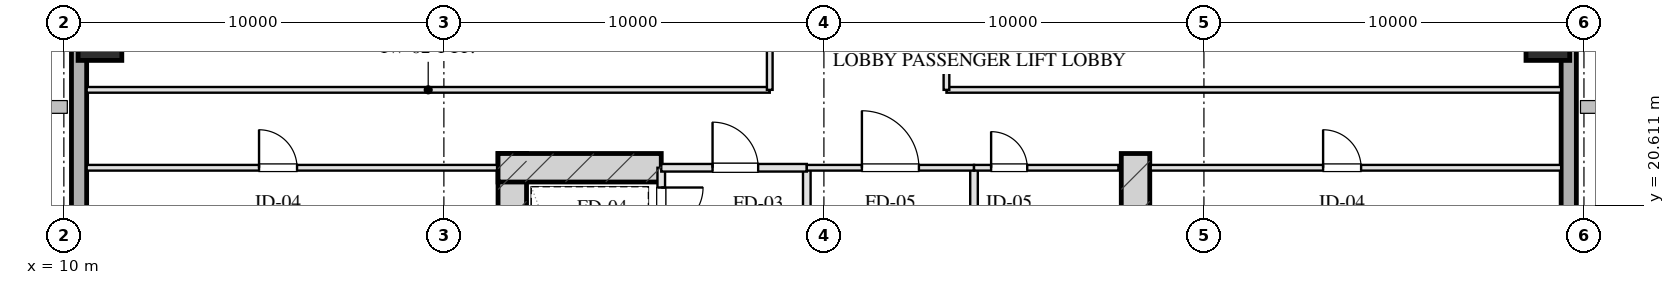
"""IFC4 building model, lengths in metres.
Left out: names, types, materials, properties, quantities, classifications, styles, units other than length and angle.
Written with IfcOpenShell. Run it as: python <this file> out.ifc"""

import sys

from ifc_helpers import new_model, si_unit, direction, frame, frame_2d, origin, origin_2d, place, context, subcontext, project, spatial, rectangle, hollow_rectangle, extrude, element, fill, save


model = new_model("IFC4")
c1 = context("Model", 3, precision=1e-05, world=origin(), true_north=direction((0.0, 1.0)))
c2 = subcontext(c1, "Body", "Model", "MODEL_VIEW")
j1 = project(units=[si_unit("LENGTHUNIT", "METRE"), si_unit("PLANEANGLEUNIT", "RADIAN")], contexts=[c1])
p1 = place(None, origin())
s1 = spatial("IfcSite", under=j1, at=p1, CompositionType="ELEMENT")
p2 = place(p1, origin())
s2 = spatial("IfcBuilding", under=s1, at=p2, CompositionType="ELEMENT")
p3 = place(p2, frame((0.0, 0.0, 67.85)))
s3 = spatial("IfcBuildingStorey", under=s2, at=p3, CompositionType="ELEMENT", Elevation=67.85)
for number, where, z_axis, x_axis in (
    (1, (21.8, 21.975, 0.0), (0.0, 0.0, 1.0), (0.0, -1.0, 0.0)),
    (2, (38.2, 21.975, 0.0), (0.0, 0.0, 1.0), (0.0, -1.0, 0.0)),
):
    element("IfcWall", number, at=place(p3, frame(where, z_axis=z_axis, x_axis=x_axis)), inside=s3, PredefinedType="SHEAR", context=c2, shape_type="SweptSolid", body=[
        extrude(rectangle(XDim=9.63, YDim=0.75, at=frame_2d((4.815, 0.0))), origin(), (0.0, 0.0, 1.0), 3.45),
    ])
p4 = place(p3, frame((21.425, 21.6, 0.0), z_axis=(0.0, 0.0, 1.0), x_axis=(1.0, 0.0, 0.0)))
e3 = element("IfcWall", 3, at=p4, inside=s3, PredefinedType="SHEAR", context=c2, shape_type="SweptSolid", body=[
    extrude(rectangle(XDim=4.295, YDim=0.75, at=frame_2d((2.147, 0.0))), origin(), (0.0, 0.0, 1.0), 3.45),
])
for number, where, z_axis, x_axis in (
    (4, (10.95, 25.0, 0.0), (0.0, 0.0, 1.0), (1.0, 0.0, 0.0)),
    (5, (49.05, 25.0, 0.0), (0.0, 0.0, 1.0), (1.0, 0.0, 0.0)),
):
    element("IfcColumn", number, at=place(p3, frame(where, z_axis=z_axis, x_axis=x_axis)), inside=s3, PredefinedType="COLUMN", context=c2, shape_type="SweptSolid", body=[
        extrude(hollow_rectangle(XDim=1.15, YDim=1.15, WallThickness=0.04, at=origin_2d()), origin(), (0.0, 0.0, 1.0), 3.451),
    ])
p5 = place(p3, frame((10.4, 7.2, 0.0), z_axis=(0.0, 0.0, 1.0), x_axis=(0.0, 1.0, 0.0)))
e6 = element("IfcWall", 6, at=p5, inside=s3, PredefinedType="SOLIDWALL", context=c2, shape_type="SweptSolid", body=[
    extrude(rectangle(XDim=53.6, YDim=0.4, at=frame_2d((26.8, 0.0))), origin(), (0.0, 0.0, 1.0), 2.61),
])
p6 = place(p5, frame((31.95, 0.0, 0.75)))
e7 = element("IfcOpeningElement", 7, at=p6, cuts=e6, PredefinedType="OPENING", context=c2, shape_type="SweptSolid", body=[
    extrude(rectangle(XDim=2.5, YDim=1.46, at=frame_2d((1.25, 0.73))), frame((0.0, 0.21, 0.0), z_axis=(0.0, -1.0, 0.0), x_axis=(1.0, 0.0, 0.0)), (0.0, 0.0, 1.0), 0.42),
])
p7 = place(p5, frame((20.45, 0.0, 0.0)))
e8 = element("IfcOpeningElement", 8, at=p7, cuts=e6, PredefinedType="OPENING", context=c2, shape_type="SweptSolid", body=[
    extrude(rectangle(XDim=1.1, YDim=2.15, at=frame_2d((0.55, 1.075))), frame((0.0, 0.21, 0.0), z_axis=(0.0, -1.0, 0.0), x_axis=(1.0, 0.0, 0.0)), (0.0, 0.0, 1.0), 0.42),
])
p8 = place(p3, frame((49.6, 60.8, 0.0), z_axis=(0.0, 0.0, 1.0), x_axis=(0.0, -1.0, 0.0)))
e9 = element("IfcWall", 9, at=p8, inside=s3, PredefinedType="SOLIDWALL", context=c2, shape_type="SweptSolid", body=[
    extrude(rectangle(XDim=53.6, YDim=0.4, at=frame_2d((26.8, 0.0))), origin(), (0.0, 0.0, 1.0), 2.61),
])
p9 = place(p8, frame((22.95, 0.0, 0.75)))
e10 = element("IfcOpeningElement", 10, at=p9, cuts=e9, PredefinedType="OPENING", context=c2, shape_type="SweptSolid", body=[
    extrude(rectangle(XDim=2.5, YDim=1.46, at=frame_2d((1.25, 0.73))), frame((0.0, 0.21, 0.0), z_axis=(0.0, -1.0, 0.0), x_axis=(1.0, 0.0, 0.0)), (0.0, 0.0, 1.0), 0.42),
])
p10 = place(p8, frame((29.35, 0.0, 0.0)))
e11 = element("IfcOpeningElement", 11, at=p10, cuts=e9, PredefinedType="OPENING", context=c2, shape_type="SweptSolid", body=[
    extrude(rectangle(XDim=1.1, YDim=2.15, at=frame_2d((0.55, 1.075))), frame((0.0, 0.21, 0.0), z_axis=(0.0, -1.0, 0.0), x_axis=(1.0, 0.0, 0.0)), (0.0, 0.0, 1.0), 0.42),
])
p11 = place(p3, frame((25.72, 21.6, 0.0), z_axis=(0.0, 0.0, 1.0), x_axis=(0.0, -1.0, 0.0)))
e12 = element("IfcWall", 12, at=p11, inside=s3, PredefinedType="PARTITIONING", context=c2, shape_type="SweptSolid", body=[
    extrude(rectangle(XDim=1.9, YDim=0.2, at=frame_2d((0.95, 0.0))), origin(), (0.0, 0.0, 1.0), 3.175),
])
p12 = place(p11, frame((0.52, 0.0, 0.0)))
e13 = element("IfcOpeningElement", 13, at=p12, cuts=e12, PredefinedType="OPENING", context=c2, shape_type="SweptSolid", body=[
    extrude(rectangle(XDim=1.1, YDim=2.05, at=frame_2d((0.55, 1.025))), frame((0.0, 0.11, 0.0), z_axis=(0.0, -1.0, 0.0), x_axis=(1.0, 0.0, 0.0)), (0.0, 0.0, 1.0), 0.22),
])
p13 = place(p3, frame((29.55, 21.6, 0.0), z_axis=(0.0, 0.0, 1.0), x_axis=(0.0, -1.0, 0.0)))
e14 = element("IfcWall", 14, at=p13, inside=s3, PredefinedType="PARTITIONING", context=c2, shape_type="SweptSolid", body=[
    extrude(rectangle(XDim=8.43, YDim=0.2, at=frame_2d((4.215, 0.0))), origin(), (0.0, 0.0, 1.0), 3.175),
])
p14 = place(p3, frame((25.72, 21.6, 0.0), z_axis=(0.0, 0.0, 1.0), x_axis=(1.0, 0.0, 0.0)))
e15 = element("IfcWall", 15, at=p14, inside=s3, PredefinedType="PARTITIONING", context=c2, shape_type="SweptSolid", body=[
    extrude(rectangle(XDim=3.83, YDim=0.2, at=frame_2d((1.915, 0.0))), origin(), (0.0, 0.0, 1.0), 3.175),
])
p15 = place(p14, frame((1.35, 0.0, 0.0)))
e16 = element("IfcOpeningElement", 16, at=p15, cuts=e15, PredefinedType="OPENING", context=c2, shape_type="SweptSolid", body=[
    extrude(rectangle(XDim=1.2, YDim=2.05, at=frame_2d((0.6, 1.025))), frame((0.0, 0.11, 0.0), z_axis=(0.0, -1.0, 0.0), x_axis=(1.0, 0.0, 0.0)), (0.0, 0.0, 1.0), 0.22),
])
p16 = place(p3, frame((33.95, 21.6, 0.0), z_axis=(0.0, 0.0, 1.0), x_axis=(0.0, -1.0, 0.0)))
e17 = element("IfcWall", 17, at=p16, inside=s3, PredefinedType="PARTITIONING", context=c2, shape_type="SweptSolid", body=[
    extrude(rectangle(XDim=8.43, YDim=0.2, at=frame_2d((4.215, 0.0))), origin(), (0.0, 0.0, 1.0), 3.175),
])
p17 = place(p3, frame((29.55, 21.6, 0.0), z_axis=(0.0, 0.0, 1.0), x_axis=(1.0, 0.0, 0.0)))
e18 = element("IfcWall", 18, at=p17, inside=s3, PredefinedType="PARTITIONING", context=c2, shape_type="SweptSolid", body=[
    extrude(rectangle(XDim=4.4, YDim=0.15, at=frame_2d((2.2, 0.0))), origin(), (0.0, 0.0, 1.0), 3.175),
])
p18 = place(p17, frame((1.45, 0.0, 0.0)))
e19 = element("IfcOpeningElement", 19, at=p18, cuts=e18, PredefinedType="OPENING", context=c2, shape_type="SweptSolid", body=[
    extrude(rectangle(XDim=1.5, YDim=2.05, at=frame_2d((0.75, 1.025))), frame((0.0, 0.085, 0.0), z_axis=(0.0, -1.0, 0.0), x_axis=(1.0, 0.0, 0.0)), (0.0, 0.0, 1.0), 0.17),
])
p19 = place(p3, frame((33.95, 21.6, 0.0), z_axis=(0.0, 0.0, 1.0), x_axis=(1.0, 0.0, 0.0)))
e20 = element("IfcWall", 20, at=p19, inside=s3, PredefinedType="PARTITIONING", context=c2, shape_type="SweptSolid", body=[
    extrude(rectangle(XDim=3.8, YDim=0.15, at=frame_2d((1.9, 0.0))), origin(), (0.0, 0.0, 1.0), 3.175),
])
p20 = place(p19, frame((0.45, 0.0, 0.0)))
e21 = element("IfcOpeningElement", 21, at=p20, cuts=e20, PredefinedType="OPENING", context=c2, shape_type="SweptSolid", body=[
    extrude(rectangle(XDim=0.95, YDim=2.05, at=frame_2d((0.475, 1.025))), frame((0.0, 0.085, 0.0), z_axis=(0.0, -1.0, 0.0), x_axis=(1.0, 0.0, 0.0)), (0.0, 0.0, 1.0), 0.17),
])
p21 = place(p3, frame((10.6, 21.6, 0.0), z_axis=(0.0, 0.0, 1.0), x_axis=(1.0, 0.0, 0.0)))
e22 = element("IfcWall", 22, at=p21, inside=s3, PredefinedType="PARTITIONING", context=c2, shape_type="SweptSolid", body=[
    extrude(rectangle(XDim=10.8, YDim=0.15, at=frame_2d((5.4, 0.0))), origin(), (0.0, 0.0, 1.0), 3.175),
])
p22 = place(p21, frame((4.536, 0.0, 0.0)))
e23 = element("IfcOpeningElement", 23, at=p22, cuts=e22, PredefinedType="OPENING", context=c2, shape_type="SweptSolid", body=[
    extrude(rectangle(XDim=1.0, YDim=2.05, at=frame_2d((0.5, 1.025))), frame((0.0, 0.085, 0.0), z_axis=(0.0, -1.0, 0.0), x_axis=(1.0, 0.0, 0.0)), (0.0, 0.0, 1.0), 0.17),
])
p23 = place(p3, frame((38.6, 21.6, 0.0), z_axis=(0.0, 0.0, 1.0), x_axis=(1.0, 0.0, 0.0)))
e24 = element("IfcWall", 24, at=p23, inside=s3, PredefinedType="PARTITIONING", context=c2, shape_type="SweptSolid", body=[
    extrude(rectangle(XDim=10.8, YDim=0.15, at=frame_2d((5.4, 0.0))), origin(), (0.0, 0.0, 1.0), 3.175),
])
p24 = place(p23, frame((4.536, 0.0, 0.0)))
e25 = element("IfcOpeningElement", 25, at=p24, cuts=e24, PredefinedType="OPENING", context=c2, shape_type="SweptSolid", body=[
    extrude(rectangle(XDim=1.0, YDim=2.05, at=frame_2d((0.5, 1.025))), frame((0.0, 0.085, 0.0), z_axis=(0.0, -1.0, 0.0), x_axis=(1.0, 0.0, 0.0)), (0.0, 0.0, 1.0), 0.17),
])
p25 = place(p3, frame((10.6, 23.65, 0.0), z_axis=(0.0, 0.0, 1.0), x_axis=(1.0, 0.0, 0.0)))
e26 = element("IfcWall", 26, at=p25, inside=s3, PredefinedType="PARTITIONING", context=c2, shape_type="SweptSolid", body=[
    extrude(rectangle(XDim=17.975, YDim=0.15, at=frame_2d((8.987, 0.0))), origin(), (0.0, 0.0, 1.0), 3.175),
])
p26 = place(p3, frame((33.225, 23.65, 0.0), z_axis=(0.0, 0.0, 1.0), x_axis=(1.0, 0.0, 0.0)))
e27 = element("IfcWall", 27, at=p26, inside=s3, PredefinedType="PARTITIONING", context=c2, shape_type="SweptSolid", body=[
    extrude(rectangle(XDim=16.175, YDim=0.15, at=frame_2d((8.087, 0.0))), origin(), (0.0, 0.0, 1.0), 3.175),
])
p27 = place(p3, frame((28.575, 23.65, 0.0), z_axis=(0.0, 0.0, 1.0), x_axis=(0.0, 1.0, 0.0)))
e28 = element("IfcWall", 28, at=p27, inside=s3, PredefinedType="PARTITIONING", context=c2, shape_type="SweptSolid", body=[
    extrude(rectangle(XDim=20.7, YDim=0.15, at=frame_2d((10.35, 0.0))), origin(), (0.0, 0.0, 1.0), 3.175),
])
p28 = place(p27, frame((2.675, 0.0, 0.0)))
e29 = element("IfcOpeningElement", 29, at=p28, cuts=e28, PredefinedType="OPENING", context=c2, shape_type="SweptSolid", body=[
    extrude(rectangle(XDim=1.0, YDim=2.05, at=frame_2d((0.5, 1.025))), frame((0.0, 0.085, 0.0), z_axis=(0.0, -1.0, 0.0), x_axis=(1.0, 0.0, 0.0)), (0.0, 0.0, 1.0), 0.17),
])
p29 = place(p27, frame((9.85, 0.0, 0.0)))
e30 = element("IfcOpeningElement", 30, at=p29, cuts=e28, PredefinedType="OPENING", context=c2, shape_type="SweptSolid", body=[
    extrude(rectangle(XDim=1.05, YDim=2.05, at=frame_2d((0.525, 1.025))), frame((0.0, 0.085, 0.0), z_axis=(0.0, -1.0, 0.0), x_axis=(1.0, 0.0, 0.0)), (0.0, 0.0, 1.0), 0.17),
])
p30 = place(p27, frame((17.025, 0.0, 0.0)))
e31 = element("IfcOpeningElement", 31, at=p30, cuts=e28, PredefinedType="OPENING", context=c2, shape_type="SweptSolid", body=[
    extrude(rectangle(XDim=1.0, YDim=2.05, at=frame_2d((0.5, 1.025))), frame((0.0, 0.085, 0.0), z_axis=(0.0, -1.0, 0.0), x_axis=(1.0, 0.0, 0.0)), (0.0, 0.0, 1.0), 0.17),
])
p31 = place(p3, frame((33.225, 23.65, 0.0), z_axis=(0.0, 0.0, 1.0), x_axis=(0.0, 1.0, 0.0)))
e32 = element("IfcWall", 32, at=p31, inside=s3, PredefinedType="PARTITIONING", context=c2, shape_type="SweptSolid", body=[
    extrude(rectangle(XDim=20.7, YDim=0.15, at=frame_2d((10.35, 0.0))), origin(), (0.0, 0.0, 1.0), 3.175),
])
p32 = place(p31, frame((2.175, 0.0, 0.0)))
e33 = element("IfcOpeningElement", 33, at=p32, cuts=e32, PredefinedType="OPENING", context=c2, shape_type="SweptSolid", body=[
    extrude(rectangle(XDim=1.0, YDim=2.05, at=frame_2d((0.5, 1.025))), frame((0.0, 0.085, 0.0), z_axis=(0.0, -1.0, 0.0), x_axis=(1.0, 0.0, 0.0)), (0.0, 0.0, 1.0), 0.17),
])
p33 = place(p31, frame((7.69, 0.0, 0.0)))
e34 = element("IfcOpeningElement", 34, at=p33, cuts=e32, PredefinedType="OPENING", context=c2, shape_type="SweptSolid", body=[
    extrude(rectangle(XDim=0.85, YDim=2.05, at=frame_2d((0.425, 1.025))), frame((0.0, 0.085, 0.0), z_axis=(0.0, -1.0, 0.0), x_axis=(1.0, 0.0, 0.0)), (0.0, 0.0, 1.0), 0.17),
])
p34 = place(p31, frame((12.69, 0.0, 0.0)))
e35 = element("IfcOpeningElement", 35, at=p34, cuts=e32, PredefinedType="OPENING", context=c2, shape_type="SweptSolid", body=[
    extrude(rectangle(XDim=1.0, YDim=2.05, at=frame_2d((0.5, 1.025))), frame((0.0, 0.085, 0.0), z_axis=(0.0, -1.0, 0.0), x_axis=(1.0, 0.0, 0.0)), (0.0, 0.0, 1.0), 0.17),
])
p35 = place(p31, frame((17.525, 0.0, 0.0)))
e36 = element("IfcOpeningElement", 36, at=p35, cuts=e32, PredefinedType="OPENING", context=c2, shape_type="SweptSolid", body=[
    extrude(rectangle(XDim=1.0, YDim=2.05, at=frame_2d((0.5, 1.025))), frame((0.0, 0.085, 0.0), z_axis=(0.0, -1.0, 0.0), x_axis=(1.0, 0.0, 0.0)), (0.0, 0.0, 1.0), 0.17),
])
p36 = place(p12, origin())
e37 = element("IfcDoor", 37, at=p36, inside=s3, OperationType="SINGLE_SWING_LEFT", PredefinedType="DOOR", context=c2, shape_type="SweptSolid", body=[
    extrude(rectangle(XDim=1.1, YDim=2.05, at=frame_2d((0.55, 1.025))), frame((0.0, 0.025, 0.0), z_axis=(0.0, -1.0, 0.0), x_axis=(1.0, 0.0, 0.0)), (0.0, 0.0, 1.0), 0.05),
])
fill(e13, e37)
p37 = place(p15, origin())
e38 = element("IfcDoor", 38, at=p37, inside=s3, OperationType="SINGLE_SWING_LEFT", PredefinedType="DOOR", context=c2, shape_type="SweptSolid", body=[
    extrude(rectangle(XDim=1.2, YDim=2.05, at=frame_2d((0.6, 1.025))), frame((0.0, 0.025, 0.0), z_axis=(0.0, -1.0, 0.0), x_axis=(1.0, 0.0, 0.0)), (0.0, 0.0, 1.0), 0.05),
])
fill(e16, e38)
p38 = place(p18, origin())
e39 = element("IfcDoor", 39, at=p38, inside=s3, OperationType="SINGLE_SWING_LEFT", PredefinedType="DOOR", context=c2, shape_type="SweptSolid", body=[
    extrude(rectangle(XDim=1.5, YDim=2.05, at=frame_2d((0.75, 1.025))), frame((0.0, 0.025, 0.0), z_axis=(0.0, -1.0, 0.0), x_axis=(1.0, 0.0, 0.0)), (0.0, 0.0, 1.0), 0.05),
])
fill(e19, e39)
p39 = place(p20, origin())
e40 = element("IfcDoor", 40, at=p39, inside=s3, OperationType="SINGLE_SWING_LEFT", PredefinedType="DOOR", context=c2, shape_type="SweptSolid", body=[
    extrude(rectangle(XDim=0.95, YDim=2.05, at=frame_2d((0.475, 1.025))), frame((0.0, 0.025, 0.0), z_axis=(0.0, -1.0, 0.0), x_axis=(1.0, 0.0, 0.0)), (0.0, 0.0, 1.0), 0.05),
])
fill(e21, e40)
p40 = place(p22, origin())
e41 = element("IfcDoor", 41, at=p40, inside=s3, OperationType="SINGLE_SWING_LEFT", PredefinedType="DOOR", context=c2, shape_type="SweptSolid", body=[
    extrude(rectangle(XDim=1.0, YDim=2.05, at=frame_2d((0.5, 1.025))), frame((0.0, 0.025, 0.0), z_axis=(0.0, -1.0, 0.0), x_axis=(1.0, 0.0, 0.0)), (0.0, 0.0, 1.0), 0.05),
])
fill(e23, e41)
p41 = place(p24, origin())
e42 = element("IfcDoor", 42, at=p41, inside=s3, OperationType="SINGLE_SWING_LEFT", PredefinedType="DOOR", context=c2, shape_type="SweptSolid", body=[
    extrude(rectangle(XDim=1.0, YDim=2.05, at=frame_2d((0.5, 1.025))), frame((0.0, 0.025, 0.0), z_axis=(0.0, -1.0, 0.0), x_axis=(1.0, 0.0, 0.0)), (0.0, 0.0, 1.0), 0.05),
])
fill(e25, e42)
save(model, sys.argv[1])
